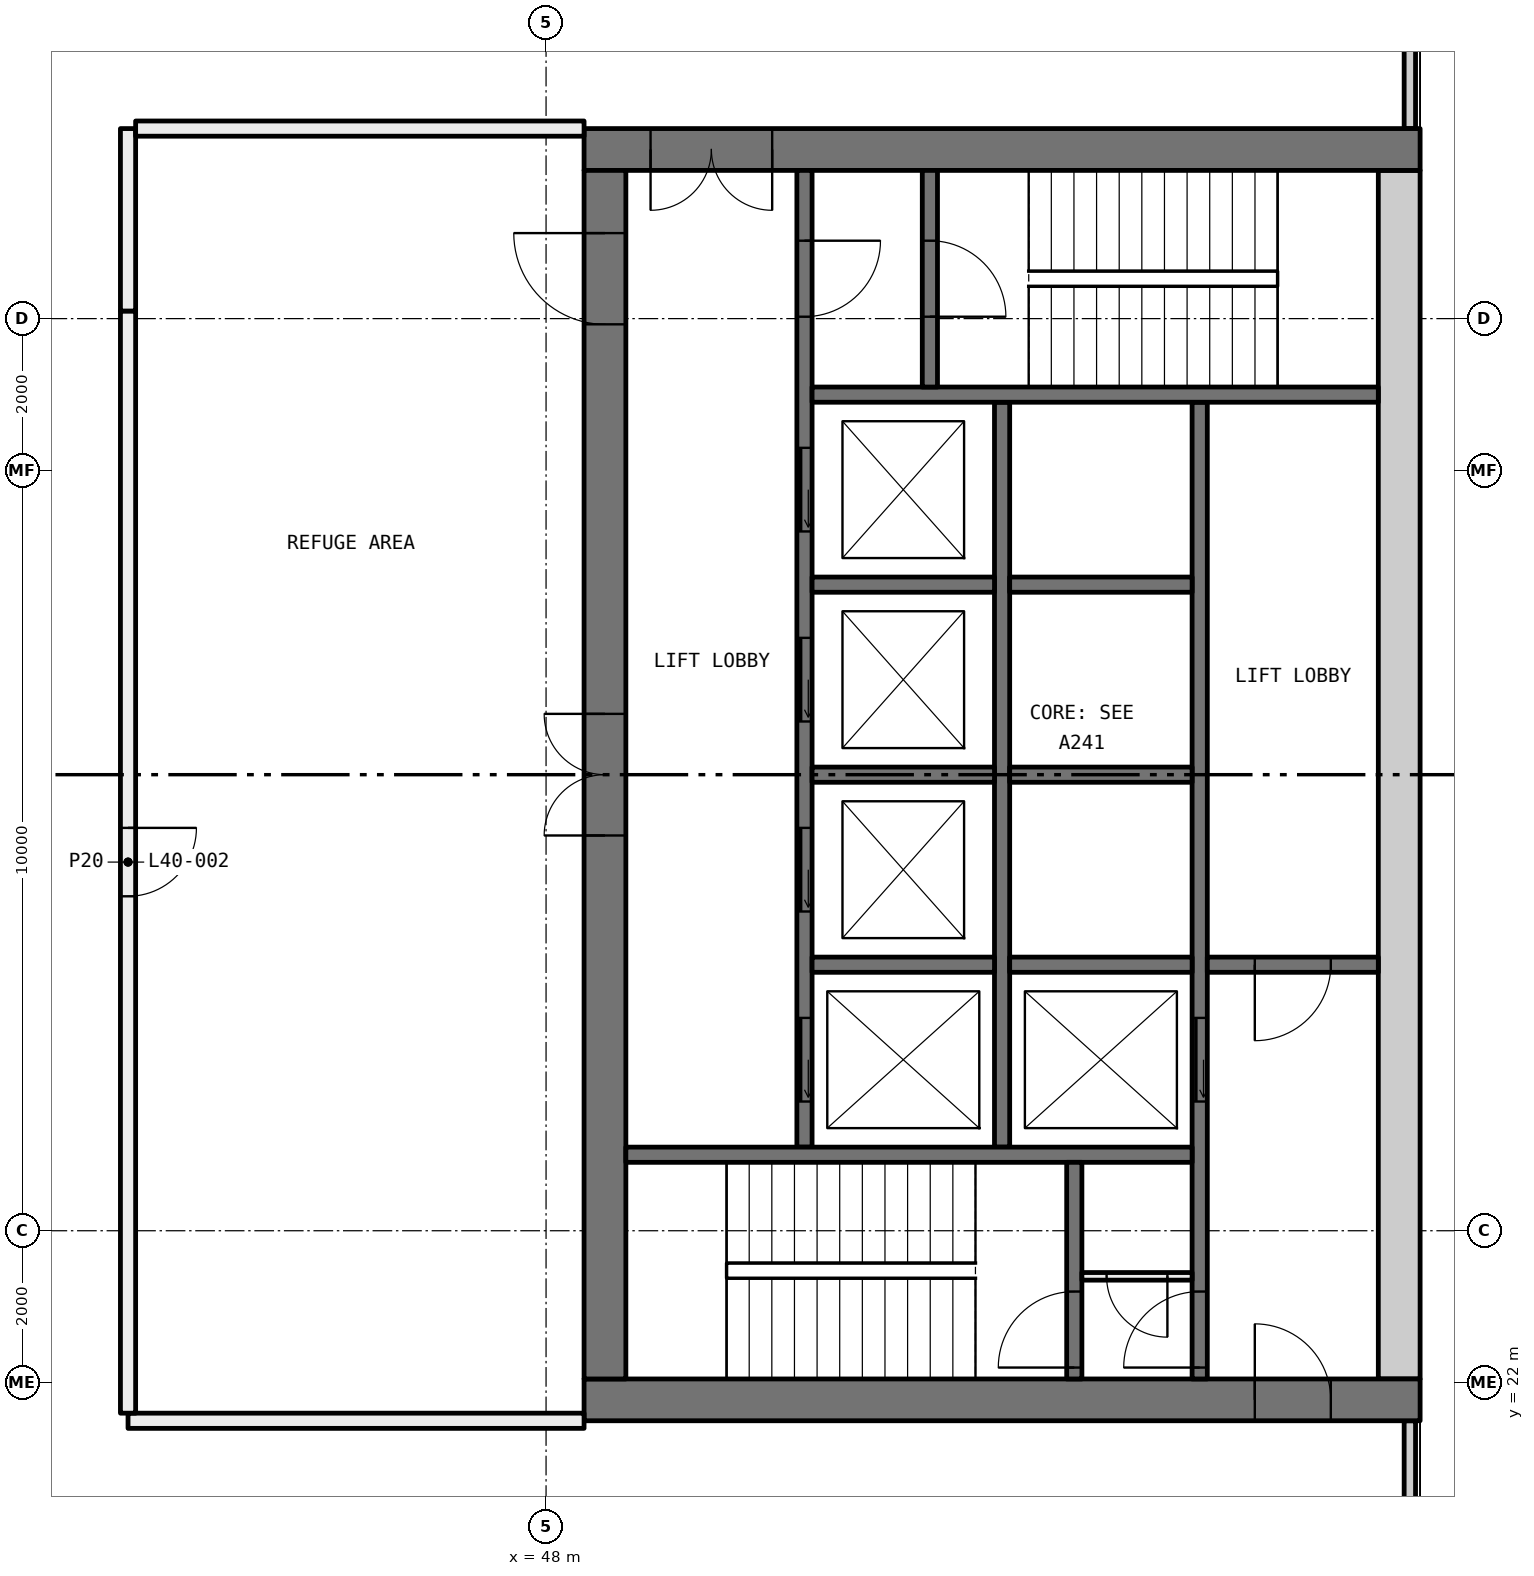
"""IFC4 building model, lengths in metres.
Left out: names, types, materials, properties, quantities, classifications, styles, units other than length and angle.
Written with IfcOpenShell. Run it as: python <this file> out.ifc"""

import sys

from ifc_helpers import new_model, si_unit, direction, frame, frame_2d, origin, place, context, subcontext, project, spatial, rectangle, extrude, element, fill, save


model = new_model("IFC4")
c1 = context("Model", 3, precision=1e-05, world=origin(), true_north=direction((0.0, 1.0)))
c2 = subcontext(c1, "Body", "Model", "MODEL_VIEW")
j1 = project(units=[si_unit("LENGTHUNIT", "METRE"), si_unit("PLANEANGLEUNIT", "RADIAN")], contexts=[c1])
p1 = place(None, origin())
s1 = spatial("IfcSite", under=j1, at=p1, CompositionType="ELEMENT")
p2 = place(p1, origin())
s2 = spatial("IfcBuilding", under=s1, at=p2, CompositionType="ELEMENT")
p3 = place(p2, frame((0.0, 0.0, 153.75)))
s3 = spatial("IfcBuildingStorey", under=s2, at=p3, CompositionType="ELEMENT", Elevation=153.75)
for number, where, z_axis, x_axis in (
    (1, (59.365, 18.71, 0.0), (0.0, 0.0, 1.0), (0.0, 1.0, 0.0)),
    (2, (59.365, 38.5, 0.0), (0.0, 0.0, 1.0), (0.0, 1.0, 0.0)),
):
    element("IfcWall", number, at=place(p3, frame(where, z_axis=z_axis, x_axis=x_axis)), inside=s3, PredefinedType="ELEMENTEDWALL", context=c2, shape_type="SweptSolid", body=[
        extrude(rectangle(XDim=2.79, YDim=0.15, at=frame_2d((1.395, 0.0))), origin(), (0.0, 0.0, 1.0), 4.1),
    ])
p4 = place(p3, frame((48.5, 21.5, 0.0), z_axis=(0.0, 0.0, 1.0), x_axis=(-1.0, 0.0, 0.0)))
e3 = element("IfcWall", 3, at=p4, inside=s3, PredefinedType="PARTITIONING", context=c2, shape_type="SweptSolid", body=[
    extrude(rectangle(XDim=6.0, YDim=0.2, at=frame_2d((3.0, 0.0))), origin(), (0.0, 0.0, 1.0), 4.1),
])
p5 = place(p3, frame((42.5, 21.6, 0.0), z_axis=(0.0, 0.0, 1.0), x_axis=(0.0, 1.0, 0.0)))
e4 = element("IfcWall", 4, at=p5, inside=s3, PredefinedType="PARTITIONING", context=c2, shape_type="SweptSolid", body=[
    extrude(rectangle(XDim=14.5, YDim=0.2, at=frame_2d((7.25, 0.0))), origin(), (0.0, 0.0, 1.0), 3.5),
])
p6 = place(p5, frame((6.8, 0.0, 0.0)))
e5 = element("IfcOpeningElement", 5, at=p6, cuts=e4, PredefinedType="OPENING", context=c2, shape_type="SweptSolid", body=[
    extrude(rectangle(XDim=0.9, YDim=2.1, at=frame_2d((0.45, 1.05))), frame((0.0, 0.11, 0.0), z_axis=(0.0, -1.0, 0.0), x_axis=(1.0, 0.0, 0.0)), (0.0, 0.0, 1.0), 0.22),
])
p7 = place(p3, frame((42.5, 36.1, 0.0), z_axis=(0.0, 0.0, 1.0), x_axis=(0.0, 1.0, 0.0)))
e6 = element("IfcWall", 6, at=p7, inside=s3, PredefinedType="PARTITIONING", context=c2, shape_type="SweptSolid", body=[
    extrude(rectangle(XDim=2.4, YDim=0.2, at=frame_2d((1.2, 0.0))), origin(), (0.0, 0.0, 1.0), 4.1),
])
p8 = place(p3, frame((42.6, 38.5, 0.0), z_axis=(0.0, 0.0, 1.0), x_axis=(1.0, 0.0, 0.0)))
e7 = element("IfcWall", 7, at=p8, inside=s3, PredefinedType="PARTITIONING", context=c2, shape_type="SweptSolid", body=[
    extrude(rectangle(XDim=5.9, YDim=0.2, at=frame_2d((2.95, 0.0))), origin(), (0.0, 0.0, 1.0), 4.1),
])
p9 = place(p3, frame((59.5, 21.775, 0.0), z_axis=(0.0, 0.0, 1.0), x_axis=(-1.0, 0.0, 0.0)))
e8 = element("IfcWall", 8, at=p9, inside=s3, PredefinedType="SHEAR", context=c2, shape_type="SweptSolid", body=[
    extrude(rectangle(XDim=11.0, YDim=0.55, at=frame_2d((5.5, 0.0))), origin(), (0.0, 0.0, 1.0), 4.1),
])
p10 = place(p9, frame((1.175, 0.0, 0.0)))
e9 = element("IfcOpeningElement", 9, at=p10, cuts=e8, PredefinedType="OPENING", context=c2, shape_type="SweptSolid", body=[
    extrude(rectangle(XDim=1.0, YDim=2.1, at=frame_2d((0.5, 1.05))), frame((0.0, 0.285, 0.0), z_axis=(0.0, -1.0, 0.0), x_axis=(1.0, 0.0, 0.0)), (0.0, 0.0, 1.0), 0.57),
])
p11 = place(p3, frame((59.5, 38.225, 0.0), z_axis=(0.0, 0.0, 1.0), x_axis=(-1.0, 0.0, 0.0)))
e10 = element("IfcWall", 10, at=p11, inside=s3, PredefinedType="SHEAR", context=c2, shape_type="SweptSolid", body=[
    extrude(rectangle(XDim=11.0, YDim=0.55, at=frame_2d((5.5, 0.0))), origin(), (0.0, 0.0, 1.0), 4.1),
])
p12 = place(p11, frame((8.525, 0.0, 0.0)))
e11 = element("IfcOpeningElement", 11, at=p12, cuts=e10, PredefinedType="OPENING", context=c2, shape_type="SweptSolid", body=[
    extrude(rectangle(XDim=1.6, YDim=2.1, at=frame_2d((0.8, 1.05))), frame((0.0, 0.285, 0.0), z_axis=(0.0, -1.0, 0.0), x_axis=(1.0, 0.0, 0.0)), (0.0, 0.0, 1.0), 0.57),
])
p13 = place(p3, frame((59.225, 22.05, 0.0), z_axis=(0.0, 0.0, 1.0), x_axis=(0.0, 1.0, 0.0)))
e12 = element("IfcWall", 12, at=p13, inside=s3, PredefinedType="SHEAR", context=c2, shape_type="SweptSolid", body=[
    extrude(rectangle(XDim=15.9, YDim=0.55, at=frame_2d((7.95, 0.0))), origin(), (0.0, 0.0, 1.0), 4.1),
])
p14 = place(p3, frame((48.775, 22.05, 0.0), z_axis=(0.0, 0.0, 1.0), x_axis=(0.0, 1.0, 0.0)))
e13 = element("IfcWall", 13, at=p14, inside=s3, PredefinedType="SHEAR", context=c2, shape_type="SweptSolid", body=[
    extrude(rectangle(XDim=15.9, YDim=0.55, at=frame_2d((7.95, 0.0))), origin(), (0.0, 0.0, 1.0), 4.1),
])
p15 = place(p14, frame((7.15, 0.0, 0.0)))
e14 = element("IfcOpeningElement", 14, at=p15, cuts=e13, PredefinedType="OPENING", context=c2, shape_type="SweptSolid", body=[
    extrude(rectangle(XDim=1.6, YDim=2.1, at=frame_2d((0.8, 1.05))), frame((0.0, 0.285, 0.0), z_axis=(0.0, -1.0, 0.0), x_axis=(1.0, 0.0, 0.0)), (0.0, 0.0, 1.0), 0.57),
])
p16 = place(p14, frame((13.875, 0.0, 0.0)))
e15 = element("IfcOpeningElement", 15, at=p16, cuts=e13, PredefinedType="OPENING", context=c2, shape_type="SweptSolid", body=[
    extrude(rectangle(XDim=1.2, YDim=2.1, at=frame_2d((0.6, 1.05))), frame((0.0, 0.285, 0.0), z_axis=(0.0, -1.0, 0.0), x_axis=(1.0, 0.0, 0.0)), (0.0, 0.0, 1.0), 0.57),
])
p17 = place(p3, frame((56.6, 22.05, 0.0), z_axis=(0.0, 0.0, 1.0), x_axis=(0.0, 1.0, 0.0)))
e16 = element("IfcWall", 16, at=p17, inside=s3, PredefinedType="SOLIDWALL", context=c2, shape_type="SweptSolid", body=[
    extrude(rectangle(XDim=12.85, YDim=0.2, at=frame_2d((6.425, 0.0))), origin(), (0.0, 0.0, 1.0), 4.1),
])
p18 = place(p17, frame((3.65, 0.0, 0.0)))
e17 = element("IfcOpeningElement", 17, at=p18, cuts=e16, PredefinedType="OPENING", context=c2, shape_type="SweptSolid", body=[
    extrude(rectangle(XDim=1.1, YDim=2.1, at=frame_2d((0.55, 1.05))), frame((0.0, 0.11, 0.0), z_axis=(0.0, -1.0, 0.0), x_axis=(1.0, 0.0, 0.0)), (0.0, 0.0, 1.0), 0.22),
])
p19 = place(p17, frame((0.15, 0.0, 0.0)))
e18 = element("IfcOpeningElement", 18, at=p19, cuts=e16, PredefinedType="OPENING", context=c2, shape_type="SweptSolid", body=[
    extrude(rectangle(XDim=1.0, YDim=2.1, at=frame_2d((0.5, 1.05))), frame((0.0, 0.11, 0.0), z_axis=(0.0, -1.0, 0.0), x_axis=(1.0, 0.0, 0.0)), (0.0, 0.0, 1.0), 0.22),
])
p20 = place(p3, frame((51.4, 25.1, 0.0), z_axis=(0.0, 0.0, 1.0), x_axis=(0.0, 1.0, 0.0)))
e19 = element("IfcWall", 19, at=p20, inside=s3, PredefinedType="SOLIDWALL", context=c2, shape_type="SweptSolid", body=[
    extrude(rectangle(XDim=12.85, YDim=0.2, at=frame_2d((6.425, 0.0))), origin(), (0.0, 0.0, 1.0), 4.1),
])
p21 = place(p20, frame((0.6, 0.0, 0.0)))
e20 = element("IfcOpeningElement", 20, at=p21, cuts=e19, PredefinedType="OPENING", context=c2, shape_type="SweptSolid", body=[
    extrude(rectangle(XDim=1.1, YDim=2.1, at=frame_2d((0.55, 1.05))), frame((0.0, 0.11, 0.0), z_axis=(0.0, -1.0, 0.0), x_axis=(1.0, 0.0, 0.0)), (0.0, 0.0, 1.0), 0.22),
])
p22 = place(p20, frame((3.1, 0.0, 0.0)))
e21 = element("IfcOpeningElement", 21, at=p22, cuts=e19, PredefinedType="OPENING", context=c2, shape_type="SweptSolid", body=[
    extrude(rectangle(XDim=1.1, YDim=2.1, at=frame_2d((0.55, 1.05))), frame((0.0, 0.11, 0.0), z_axis=(0.0, -1.0, 0.0), x_axis=(1.0, 0.0, 0.0)), (0.0, 0.0, 1.0), 0.22),
])
p23 = place(p20, frame((5.6, 0.0, 0.0)))
e22 = element("IfcOpeningElement", 22, at=p23, cuts=e19, PredefinedType="OPENING", context=c2, shape_type="SweptSolid", body=[
    extrude(rectangle(XDim=1.1, YDim=2.1, at=frame_2d((0.55, 1.05))), frame((0.0, 0.11, 0.0), z_axis=(0.0, -1.0, 0.0), x_axis=(1.0, 0.0, 0.0)), (0.0, 0.0, 1.0), 0.22),
])
p24 = place(p20, frame((8.1, 0.0, 0.0)))
e23 = element("IfcOpeningElement", 23, at=p24, cuts=e19, PredefinedType="OPENING", context=c2, shape_type="SweptSolid", body=[
    extrude(rectangle(XDim=1.1, YDim=2.1, at=frame_2d((0.55, 1.05))), frame((0.0, 0.11, 0.0), z_axis=(0.0, -1.0, 0.0), x_axis=(1.0, 0.0, 0.0)), (0.0, 0.0, 1.0), 0.22),
])
p25 = place(p20, frame((10.925, 0.0, 0.0)))
e24 = element("IfcOpeningElement", 24, at=p25, cuts=e19, PredefinedType="OPENING", context=c2, shape_type="SweptSolid", body=[
    extrude(rectangle(XDim=1.0, YDim=2.1, at=frame_2d((0.5, 1.05))), frame((0.0, 0.11, 0.0), z_axis=(0.0, -1.0, 0.0), x_axis=(1.0, 0.0, 0.0)), (0.0, 0.0, 1.0), 0.22),
])
p26 = place(p3, frame((54.0, 25.1, 0.0), z_axis=(0.0, 0.0, 1.0), x_axis=(0.0, 1.0, 0.0)))
e25 = element("IfcWall", 25, at=p26, inside=s3, PredefinedType="SOLIDWALL", context=c2, shape_type="SweptSolid", body=[
    extrude(rectangle(XDim=9.8, YDim=0.2, at=frame_2d((4.9, 0.0))), origin(), (0.0, 0.0, 1.0), 4.1),
])
for number, where, z_axis, x_axis in (
    (26, (56.5, 25.0, 0.0), (0.0, 0.0, 1.0), (-1.0, 0.0, 0.0)),
    (27, (58.95, 35.0, 0.0), (0.0, 0.0, 1.0), (-1.0, 0.0, 0.0)),
):
    element("IfcWall", number, at=place(p3, frame(where, z_axis=z_axis, x_axis=x_axis)), inside=s3, PredefinedType="SOLIDWALL", context=c2, shape_type="SweptSolid", body=[
        extrude(rectangle(XDim=7.45, YDim=0.2, at=frame_2d((3.725, 0.0))), origin(), (0.0, 0.0, 1.0), 4.1),
    ])
p27 = place(p3, frame((58.95, 27.5, 0.0), z_axis=(0.0, 0.0, 1.0), x_axis=(-1.0, 0.0, 0.0)))
e28 = element("IfcWall", 28, at=p27, inside=s3, PredefinedType="SOLIDWALL", context=c2, shape_type="SweptSolid", body=[
    extrude(rectangle(XDim=2.25, YDim=0.2, at=frame_2d((1.125, 0.0))), origin(), (0.0, 0.0, 1.0), 4.1),
])
p28 = place(p27, frame((0.625, 0.0, 0.0)))
e29 = element("IfcOpeningElement", 29, at=p28, cuts=e28, PredefinedType="OPENING", context=c2, shape_type="SweptSolid", body=[
    extrude(rectangle(XDim=1.0, YDim=2.1, at=frame_2d((0.5, 1.05))), frame((0.0, 0.11, 0.0), z_axis=(0.0, -1.0, 0.0), x_axis=(1.0, 0.0, 0.0)), (0.0, 0.0, 1.0), 0.22),
])
p29 = place(p3, frame((54.95, 22.05, 0.0), z_axis=(0.0, 0.0, 1.0), x_axis=(0.0, 1.0, 0.0)))
e30 = element("IfcWall", 30, at=p29, inside=s3, PredefinedType="SOLIDWALL", context=c2, shape_type="SweptSolid", body=[
    extrude(rectangle(XDim=2.85, YDim=0.2, at=frame_2d((1.425, 0.0))), origin(), (0.0, 0.0, 1.0), 4.1),
])
p30 = place(p29, frame((0.15, 0.0, 0.0)))
e31 = element("IfcOpeningElement", 31, at=p30, cuts=e30, PredefinedType="OPENING", context=c2, shape_type="SweptSolid", body=[
    extrude(rectangle(XDim=1.0, YDim=2.1, at=frame_2d((0.5, 1.05))), frame((0.0, 0.11, 0.0), z_axis=(0.0, -1.0, 0.0), x_axis=(1.0, 0.0, 0.0)), (0.0, 0.0, 1.0), 0.22),
])
p31 = place(p3, frame((53.05, 35.1, 0.0), z_axis=(0.0, 0.0, 1.0), x_axis=(0.0, 1.0, 0.0)))
e32 = element("IfcWall", 32, at=p31, inside=s3, PredefinedType="SOLIDWALL", context=c2, shape_type="SweptSolid", body=[
    extrude(rectangle(XDim=2.85, YDim=0.2, at=frame_2d((1.425, 0.0))), origin(), (0.0, 0.0, 1.0), 4.1),
])
p32 = place(p31, frame((0.925, 0.0, 0.0)))
e33 = element("IfcOpeningElement", 33, at=p32, cuts=e32, PredefinedType="OPENING", context=c2, shape_type="SweptSolid", body=[
    extrude(rectangle(XDim=1.0, YDim=2.1, at=frame_2d((0.5, 1.05))), frame((0.0, 0.11, 0.0), z_axis=(0.0, -1.0, 0.0), x_axis=(1.0, 0.0, 0.0)), (0.0, 0.0, 1.0), 0.22),
])
for number, where, z_axis, x_axis in (
    (34, (56.5, 27.5, 0.0), (0.0, 0.0, 1.0), (-1.0, 0.0, 0.0)),
    (35, (56.5, 30.0, 0.0), (0.0, 0.0, 1.0), (-1.0, 0.0, 0.0)),
    (36, (56.5, 32.5, 0.0), (0.0, 0.0, 1.0), (-1.0, 0.0, 0.0)),
    (37, (53.9, 27.5, 0.0), (0.0, 0.0, 1.0), (-1.0, 0.0, 0.0)),
    (38, (53.9, 30.0, 0.0), (0.0, 0.0, 1.0), (-1.0, 0.0, 0.0)),
    (39, (53.9, 32.5, 0.0), (0.0, 0.0, 1.0), (-1.0, 0.0, 0.0)),
):
    element("IfcWall", number, at=place(p3, frame(where, z_axis=z_axis, x_axis=x_axis)), inside=s3, PredefinedType="SOLIDWALL", context=c2, shape_type="SweptSolid", body=[
        extrude(rectangle(XDim=2.4, YDim=0.2, at=frame_2d((1.2, 0.0))), origin(), (0.0, 0.0, 1.0), 4.1),
    ])
p33 = place(p3, frame((56.5, 23.4, 0.0), z_axis=(0.0, 0.0, 1.0), x_axis=(-1.0, 0.0, 0.0)))
e40 = element("IfcWall", 40, at=p33, inside=s3, PredefinedType="PARTITIONING", context=c2, shape_type="SweptSolid", body=[
    extrude(rectangle(XDim=1.45, YDim=0.1, at=frame_2d((0.725, 0.0))), origin(), (0.0, 0.0, 1.0), 4.1),
])
p34 = place(p33, frame((0.325, 0.0, 0.0)))
e41 = element("IfcOpeningElement", 41, at=p34, cuts=e40, PredefinedType="OPENING", context=c2, shape_type="SweptSolid", body=[
    extrude(rectangle(XDim=0.8, YDim=2.1, at=frame_2d((0.4, 1.05))), frame((0.0, 0.06, 0.0), z_axis=(0.0, -1.0, 0.0), x_axis=(1.0, 0.0, 0.0)), (0.0, 0.0, 1.0), 0.12),
])
p35 = place(p6, frame((0.9, 0.0, 0.0), x_axis=(-1.0, 0.0, 0.0)))
e42 = element("IfcDoor", 42, at=p35, inside=s3, OperationType="SINGLE_SWING_RIGHT", PredefinedType="DOOR", context=c2, shape_type="SweptSolid", body=[
    extrude(rectangle(XDim=0.9, YDim=2.1, at=frame_2d((0.45, 1.05))), frame((0.0, 0.025, 0.0), z_axis=(0.0, -1.0, 0.0), x_axis=(1.0, 0.0, 0.0)), (0.0, 0.0, 1.0), 0.05),
])
fill(e5, e42)
p36 = place(p21, origin())
e43 = element("IfcDoor", 43, at=p36, inside=s3, OperationType="SLIDING_TO_LEFT", PredefinedType="DOOR", context=c2, shape_type="SweptSolid", body=[
    extrude(rectangle(XDim=1.1, YDim=2.1, at=frame_2d((0.55, 1.05))), frame((0.0, 0.025, 0.0), z_axis=(0.0, -1.0, 0.0), x_axis=(1.0, 0.0, 0.0)), (0.0, 0.0, 1.0), 0.05),
])
fill(e20, e43)
p37 = place(p22, origin())
e44 = element("IfcDoor", 44, at=p37, inside=s3, OperationType="SLIDING_TO_LEFT", PredefinedType="DOOR", context=c2, shape_type="SweptSolid", body=[
    extrude(rectangle(XDim=1.1, YDim=2.1, at=frame_2d((0.55, 1.05))), frame((0.0, 0.025, 0.0), z_axis=(0.0, -1.0, 0.0), x_axis=(1.0, 0.0, 0.0)), (0.0, 0.0, 1.0), 0.05),
])
fill(e21, e44)
p38 = place(p23, origin())
e45 = element("IfcDoor", 45, at=p38, inside=s3, OperationType="SLIDING_TO_LEFT", PredefinedType="DOOR", context=c2, shape_type="SweptSolid", body=[
    extrude(rectangle(XDim=1.1, YDim=2.1, at=frame_2d((0.55, 1.05))), frame((0.0, 0.025, 0.0), z_axis=(0.0, -1.0, 0.0), x_axis=(1.0, 0.0, 0.0)), (0.0, 0.0, 1.0), 0.05),
])
fill(e22, e45)
p39 = place(p24, origin())
e46 = element("IfcDoor", 46, at=p39, inside=s3, OperationType="SLIDING_TO_LEFT", PredefinedType="DOOR", context=c2, shape_type="SweptSolid", body=[
    extrude(rectangle(XDim=1.1, YDim=2.1, at=frame_2d((0.55, 1.05))), frame((0.0, 0.025, 0.0), z_axis=(0.0, -1.0, 0.0), x_axis=(1.0, 0.0, 0.0)), (0.0, 0.0, 1.0), 0.05),
])
fill(e23, e46)
p40 = place(p18, origin())
e47 = element("IfcDoor", 47, at=p40, inside=s3, OperationType="SLIDING_TO_LEFT", PredefinedType="DOOR", context=c2, shape_type="SweptSolid", body=[
    extrude(rectangle(XDim=1.1, YDim=2.1, at=frame_2d((0.55, 1.05))), frame((0.0, 0.025, 0.0), z_axis=(0.0, -1.0, 0.0), x_axis=(1.0, 0.0, 0.0)), (0.0, 0.0, 1.0), 0.05),
])
fill(e17, e47)
p41 = place(p30, origin())
e48 = element("IfcDoor", 48, at=p41, inside=s3, OperationType="SINGLE_SWING_RIGHT", PredefinedType="DOOR", context=c2, shape_type="SweptSolid", body=[
    extrude(rectangle(XDim=1.0, YDim=2.1, at=frame_2d((0.5, 1.05))), frame((0.0, 0.025, 0.0), z_axis=(0.0, -1.0, 0.0), x_axis=(1.0, 0.0, 0.0)), (0.0, 0.0, 1.0), 0.05),
])
fill(e31, e48)
p42 = place(p19, origin())
e49 = element("IfcDoor", 49, at=p42, inside=s3, OperationType="SINGLE_SWING_RIGHT", PredefinedType="DOOR", context=c2, shape_type="SweptSolid", body=[
    extrude(rectangle(XDim=1.0, YDim=2.1, at=frame_2d((0.5, 1.05))), frame((0.0, 0.025, 0.0), z_axis=(0.0, -1.0, 0.0), x_axis=(1.0, 0.0, 0.0)), (0.0, 0.0, 1.0), 0.05),
])
fill(e18, e49)
p43 = place(p25, frame((1.0, 0.0, 0.0), x_axis=(-1.0, 0.0, 0.0)))
e50 = element("IfcDoor", 50, at=p43, inside=s3, OperationType="SINGLE_SWING_RIGHT", PredefinedType="DOOR", context=c2, shape_type="SweptSolid", body=[
    extrude(rectangle(XDim=1.0, YDim=2.1, at=frame_2d((0.5, 1.05))), frame((0.0, 0.025, 0.0), z_axis=(0.0, -1.0, 0.0), x_axis=(1.0, 0.0, 0.0)), (0.0, 0.0, 1.0), 0.05),
])
fill(e24, e50)
p44 = place(p32, frame((1.0, 0.0, 0.0), x_axis=(-1.0, 0.0, 0.0)))
e51 = element("IfcDoor", 51, at=p44, inside=s3, OperationType="SINGLE_SWING_LEFT", PredefinedType="DOOR", context=c2, shape_type="SweptSolid", body=[
    extrude(rectangle(XDim=1.0, YDim=2.1, at=frame_2d((0.5, 1.05))), frame((0.0, 0.025, 0.0), z_axis=(0.0, -1.0, 0.0), x_axis=(1.0, 0.0, 0.0)), (0.0, 0.0, 1.0), 0.05),
])
fill(e33, e51)
p45 = place(p28, origin())
e52 = element("IfcDoor", 52, at=p45, inside=s3, OperationType="SINGLE_SWING_LEFT", PredefinedType="DOOR", context=c2, shape_type="SweptSolid", body=[
    extrude(rectangle(XDim=1.0, YDim=2.1, at=frame_2d((0.5, 1.05))), frame((0.0, 0.025, 0.0), z_axis=(0.0, -1.0, 0.0), x_axis=(1.0, 0.0, 0.0)), (0.0, 0.0, 1.0), 0.05),
])
fill(e29, e52)
p46 = place(p34, origin())
e53 = element("IfcDoor", 53, at=p46, inside=s3, OperationType="SINGLE_SWING_RIGHT", PredefinedType="DOOR", context=c2, shape_type="SweptSolid", body=[
    extrude(rectangle(XDim=0.8, YDim=2.1, at=frame_2d((0.4, 1.05))), frame((0.0, 0.025, 0.0), z_axis=(0.0, -1.0, 0.0), x_axis=(1.0, 0.0, 0.0)), (0.0, 0.0, 1.0), 0.05),
])
fill(e41, e53)
p47 = place(p10, frame((1.0, 0.0, 0.0), x_axis=(-1.0, 0.0, 0.0)))
e54 = element("IfcDoor", 54, at=p47, inside=s3, OperationType="SINGLE_SWING_RIGHT", PredefinedType="DOOR", context=c2, shape_type="SweptSolid", body=[
    extrude(rectangle(XDim=1.0, YDim=2.1, at=frame_2d((0.5, 1.05))), frame((0.0, 0.025, 0.0), z_axis=(0.0, -1.0, 0.0), x_axis=(1.0, 0.0, 0.0)), (0.0, 0.0, 1.0), 0.05),
])
fill(e9, e54)
p48 = place(p12, origin())
e55 = element("IfcDoor", 55, at=p48, inside=s3, OperationType="DOUBLE_DOOR_SINGLE_SWING", PredefinedType="DOOR", context=c2, shape_type="SweptSolid", body=[
    extrude(rectangle(XDim=1.6, YDim=2.1, at=frame_2d((0.8, 1.05))), frame((0.0, 0.025, 0.0), z_axis=(0.0, -1.0, 0.0), x_axis=(1.0, 0.0, 0.0)), (0.0, 0.0, 1.0), 0.05),
])
fill(e11, e55)
p49 = place(p15, origin())
e56 = element("IfcDoor", 56, at=p49, inside=s3, OperationType="DOUBLE_DOOR_SINGLE_SWING", PredefinedType="DOOR", context=c2, shape_type="SweptSolid", body=[
    extrude(rectangle(XDim=1.6, YDim=2.1, at=frame_2d((0.8, 1.05))), frame((0.0, 0.025, 0.0), z_axis=(0.0, -1.0, 0.0), x_axis=(1.0, 0.0, 0.0)), (0.0, 0.0, 1.0), 0.05),
])
fill(e14, e56)
p50 = place(p16, origin())
e57 = element("IfcDoor", 57, at=p50, inside=s3, OperationType="SINGLE_SWING_LEFT", PredefinedType="DOOR", context=c2, shape_type="SweptSolid", body=[
    extrude(rectangle(XDim=1.2, YDim=2.1, at=frame_2d((0.6, 1.05))), frame((0.0, 0.025, 0.0), z_axis=(0.0, -1.0, 0.0), x_axis=(1.0, 0.0, 0.0)), (0.0, 0.0, 1.0), 0.05),
])
fill(e15, e57)
save(model, sys.argv[1])
